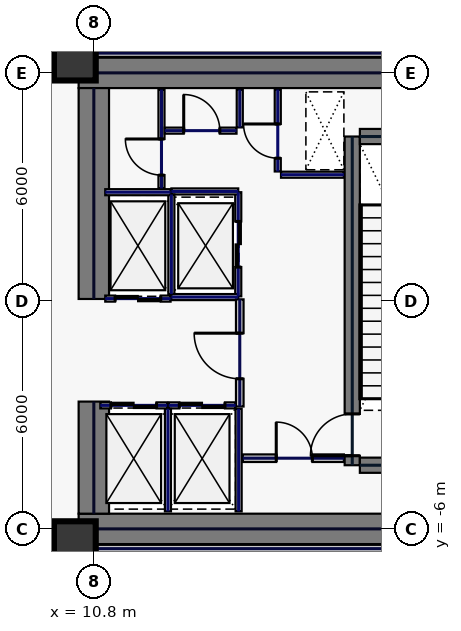
"""IFC4 building model, lengths in metres.
Left out: names, types, materials, properties, quantities, classifications, styles, units other than length and angle.
Written with IfcOpenShell. Run it as: python <this file> out.ifc"""

import sys

from ifc_helpers import new_model, si_unit, direction, frame, frame_2d, origin, origin_2d, place, context, subcontext, project, spatial, rectangle, extrude, element, fill, save


model = new_model("IFC4")
c1 = context("Model", 3, precision=1e-05, world=origin(), true_north=direction((0.0, 1.0)))
c2 = subcontext(c1, "Body", "Model", "MODEL_VIEW")
j1 = project(units=[si_unit("LENGTHUNIT", "METRE"), si_unit("PLANEANGLEUNIT", "RADIAN")], contexts=[c1])
p1 = place(None, origin())
s1 = spatial("IfcSite", under=j1, at=p1, CompositionType="ELEMENT")
p2 = place(p1, origin())
s2 = spatial("IfcBuilding", under=s1, at=p2, CompositionType="ELEMENT")
p3 = place(p2, frame((0.0, 0.0, -5.4)))
s3 = spatial("IfcBuildingStorey", under=s2, at=p3, CompositionType="ELEMENT", Elevation=-5.4)
for number, where, z_axis, x_axis in (
    (1, (10.4, 6.0, 0.0), (0.0, 0.0, 1.0), (1.0, 0.0, 0.0)),
    (2, (10.4, -6.0, 0.0), (0.0, 0.0, 1.0), (1.0, 0.0, 0.0)),
):
    element("IfcWall", number, at=place(p3, frame(where, z_axis=z_axis, x_axis=x_axis)), inside=s3, PredefinedType="SHEAR", context=c2, shape_type="SweptSolid", body=[
        extrude(rectangle(XDim=11.6, YDim=0.8, at=frame_2d((5.8, 0.0))), origin(), (0.0, 0.0, 1.0), 5.05),
    ])
p4 = place(p3, frame((10.8, -5.6, 0.0), z_axis=(0.0, 0.0, 1.0), x_axis=(0.0, 1.0, 0.0)))
e3 = element("IfcWall", 3, at=p4, inside=s3, PredefinedType="SHEAR", context=c2, shape_type="SweptSolid", body=[
    extrude(rectangle(XDim=2.95, YDim=0.8, at=frame_2d((1.475, 0.0))), origin(), (0.0, 0.0, 1.0), 5.05),
])
p5 = place(p3, frame((10.8, 0.05, 0.0), z_axis=(0.0, 0.0, 1.0), x_axis=(0.0, 1.0, 0.0)))
e4 = element("IfcWall", 4, at=p5, inside=s3, PredefinedType="SHEAR", context=c2, shape_type="SweptSolid", body=[
    extrude(rectangle(XDim=5.55, YDim=0.8, at=frame_2d((2.775, 0.0))), origin(), (0.0, 0.0, 1.0), 5.05),
])
p6 = place(p3, frame((17.6, -4.325, 0.0), z_axis=(0.0, 0.0, 1.0), x_axis=(0.0, 1.0, 0.0)))
e5 = element("IfcWall", 5, at=p6, inside=s3, PredefinedType="SHEAR", context=c2, shape_type="SweptSolid", body=[
    extrude(rectangle(XDim=8.65, YDim=0.4, at=frame_2d((4.325, 0.0))), origin(), (0.0, 0.0, 1.0), 5.05),
])
p7 = place(p6, frame((0.25, 0.0, 0.0)))
e6 = element("IfcOpeningElement", 6, at=p7, cuts=e5, PredefinedType="OPENING", context=c2, shape_type="SweptSolid", body=[
    extrude(rectangle(XDim=1.1, YDim=2.2, at=frame_2d((0.55, 1.1))), frame((0.0, 0.21, 0.0), z_axis=(0.0, -1.0, 0.0), x_axis=(1.0, 0.0, 0.0)), (0.0, 0.0, 1.0), 0.42),
])
for number, where, z_axis, x_axis in (
    (7, (17.8, -4.325, 0.0), (0.0, 0.0, 1.0), (1.0, 0.0, 0.0)),
    (8, (17.8, 4.325, 0.0), (0.0, 0.0, 1.0), (1.0, 0.0, 0.0)),
):
    element("IfcWall", number, at=place(p3, frame(where, z_axis=z_axis, x_axis=x_axis)), inside=s3, PredefinedType="SHEAR", context=c2, shape_type="SweptSolid", body=[
        extrude(rectangle(XDim=3.4, YDim=0.4, at=frame_2d((1.7, 0.0))), origin(), (0.0, 0.0, 1.0), 5.05),
    ])
for number, where, z_axis, x_axis in (
    (9, (10.3, -6.35, 0.0), (0.0, 0.0, 1.0), (1.0, 0.0, 0.0)),
    (10, (10.3, 6.35, 0.0), (0.0, 0.0, 1.0), (1.0, 0.0, 0.0)),
):
    element("IfcColumn", number, at=place(p3, frame(where, z_axis=z_axis, x_axis=x_axis)), inside=s3, PredefinedType="COLUMN", context=c2, shape_type="SweptSolid", body=[
        extrude(rectangle(XDim=1.1, YDim=1.1, at=origin_2d()), origin(), (0.0, 0.0, 1.0), 5.05),
    ])
p8 = place(p3, frame((14.6, 0.12, 0.0), z_axis=(0.0, 0.0, 1.0), x_axis=(0.0, 1.0, 0.0)))
e11 = element("IfcWall", 11, at=p8, inside=s3, PredefinedType="PARTITIONING", context=c2, shape_type="SweptSolid", body=[
    extrude(rectangle(XDim=2.74, YDim=0.16, at=frame_2d((1.37, 0.0))), origin(), (0.0, 0.0, 1.0), 5.05),
])
p9 = place(p8, frame((0.77, 0.0, 0.0)))
e12 = element("IfcOpeningElement", 12, at=p9, cuts=e11, PredefinedType="OPENING", context=c2, shape_type="SweptSolid", body=[
    extrude(rectangle(XDim=1.2, YDim=2.2, at=frame_2d((0.6, 1.1))), frame((0.0, 0.09, 0.0), z_axis=(0.0, -1.0, 0.0), x_axis=(1.0, 0.0, 0.0)), (0.0, 0.0, 1.0), 0.18),
])
for number, where, z_axis, x_axis in (
    (13, (12.84, 0.1, 0.0), (0.0, 0.0, 1.0), (1.0, 0.0, 0.0)),
    (14, (12.84, 2.88, 0.0), (0.0, 0.0, 1.0), (1.0, 0.0, 0.0)),
):
    element("IfcWall", number, at=place(p3, frame(where, z_axis=z_axis, x_axis=x_axis)), inside=s3, PredefinedType="PARTITIONING", context=c2, shape_type="SweptSolid", body=[
        extrude(rectangle(XDim=1.76, YDim=0.16, at=frame_2d((0.88, 0.0))), origin(), (0.0, 0.0, 1.0), 5.05),
    ])
p10 = place(p3, frame((12.84, 0.18, 0.0), z_axis=(0.0, 0.0, 1.0), x_axis=(0.0, 1.0, 0.0)))
e15 = element("IfcWall", 15, at=p10, inside=s3, PredefinedType="PARTITIONING", context=c2, shape_type="SweptSolid", body=[
    extrude(rectangle(XDim=2.62, YDim=0.16, at=frame_2d((1.31, 0.0))), origin(), (0.0, 0.0, 1.0), 5.05),
])
p11 = place(p3, frame((12.77, -2.75, 0.0), z_axis=(0.0, 0.0, 1.0), x_axis=(1.0, 0.0, 0.0)))
e16 = element("IfcWall", 16, at=p11, inside=s3, PredefinedType="PARTITIONING", context=c2, shape_type="SweptSolid", body=[
    extrude(rectangle(XDim=1.76, YDim=0.16, at=frame_2d((0.88, 0.0))), origin(), (0.0, 0.0, 1.0), 5.05),
])
p12 = place(p11, frame((0.28, 0.0, 0.0)))
e17 = element("IfcOpeningElement", 17, at=p12, cuts=e16, PredefinedType="OPENING", context=c2, shape_type="SweptSolid", body=[
    extrude(rectangle(XDim=1.2, YDim=2.2, at=frame_2d((0.6, 1.1))), frame((0.0, 0.09, 0.0), z_axis=(0.0, -1.0, 0.0), x_axis=(1.0, 0.0, 0.0)), (0.0, 0.0, 1.0), 0.18),
])
for number, where, z_axis, x_axis in (
    (18, (12.75, -5.54, 0.0), (0.0, 0.0, 1.0), (0.0, 1.0, 0.0)),
    (19, (14.61, -5.54, 0.0), (0.0, 0.0, 1.0), (0.0, 1.0, 0.0)),
):
    element("IfcWall", number, at=place(p3, frame(where, z_axis=z_axis, x_axis=x_axis)), inside=s3, PredefinedType="PARTITIONING", context=c2, shape_type="SweptSolid", body=[
        extrude(rectangle(XDim=2.7, YDim=0.16, at=frame_2d((1.35, 0.0))), origin(), (0.0, 0.0, 1.0), 5.05),
    ])
p13 = place(p3, frame((10.97, -2.75, 0.0), z_axis=(0.0, 0.0, 1.0), x_axis=(1.0, 0.0, 0.0)))
e20 = element("IfcWall", 20, at=p13, inside=s3, PredefinedType="PARTITIONING", context=c2, shape_type="SweptSolid", body=[
    extrude(rectangle(XDim=1.76, YDim=0.16, at=frame_2d((0.88, 0.0))), origin(), (0.0, 0.0, 1.0), 5.05),
])
p14 = place(p13, frame((0.28, 0.0, 0.0)))
e21 = element("IfcOpeningElement", 21, at=p14, cuts=e20, PredefinedType="OPENING", context=c2, shape_type="SweptSolid", body=[
    extrude(rectangle(XDim=1.2, YDim=2.2, at=frame_2d((0.6, 1.1))), frame((0.0, 0.09, 0.0), z_axis=(0.0, -1.0, 0.0), x_axis=(1.0, 0.0, 0.0)), (0.0, 0.0, 1.0), 0.18),
])
p15 = place(p3, frame((11.1, 0.06, 0.0), z_axis=(0.0, 0.0, 1.0), x_axis=(1.0, 0.0, 0.0)))
e22 = element("IfcWall", 22, at=p15, inside=s3, PredefinedType="PARTITIONING", context=c2, shape_type="SweptSolid", body=[
    extrude(rectangle(XDim=1.72, YDim=0.16, at=frame_2d((0.86, 0.0))), origin(), (0.0, 0.0, 1.0), 5.05),
])
p16 = place(p15, frame((0.26, 0.0, 0.0)))
e23 = element("IfcOpeningElement", 23, at=p16, cuts=e22, PredefinedType="OPENING", context=c2, shape_type="SweptSolid", body=[
    extrude(rectangle(XDim=1.2, YDim=2.2, at=frame_2d((0.6, 1.1))), frame((0.0, 0.09, 0.0), z_axis=(0.0, -1.0, 0.0), x_axis=(1.0, 0.0, 0.0)), (0.0, 0.0, 1.0), 0.18),
])
p17 = place(p3, frame((11.1, 2.86, 0.0), z_axis=(0.0, 0.0, 1.0), x_axis=(1.0, 0.0, 0.0)))
e24 = element("IfcWall", 24, at=p17, inside=s3, PredefinedType="PARTITIONING", context=c2, shape_type="SweptSolid", body=[
    extrude(rectangle(XDim=1.72, YDim=0.16, at=frame_2d((0.86, 0.0))), origin(), (0.0, 0.0, 1.0), 5.05),
])
p18 = place(p3, frame((15.64, 3.405, 0.0), z_axis=(0.0, 0.0, 1.0), x_axis=(0.0, 1.0, 0.0)))
e25 = element("IfcWall", 25, at=p18, inside=s3, PredefinedType="PARTITIONING", context=c2, shape_type="SweptSolid", body=[
    extrude(rectangle(XDim=2.155, YDim=0.16, at=frame_2d((1.078, 0.0))), origin(), (0.0, 0.0, 1.0), 5.05),
])
p19 = place(p18, frame((0.35, 0.0, 0.0)))
e26 = element("IfcOpeningElement", 26, at=p19, cuts=e25, PredefinedType="OPENING", context=c2, shape_type="SweptSolid", body=[
    extrude(rectangle(XDim=0.9, YDim=2.2, at=frame_2d((0.45, 1.1))), frame((0.0, 0.09, 0.0), z_axis=(0.0, -1.0, 0.0), x_axis=(1.0, 0.0, 0.0)), (0.0, 0.0, 1.0), 0.18),
])
p20 = place(p3, frame((15.725, 3.32, 0.0), z_axis=(0.0, 0.0, 1.0), x_axis=(1.0, 0.0, 0.0)))
e27 = element("IfcWall", 27, at=p20, inside=s3, PredefinedType="PARTITIONING", context=c2, shape_type="SweptSolid", body=[
    extrude(rectangle(XDim=1.655, YDim=0.16, at=frame_2d((0.827, 0.0))), origin(), (0.0, 0.0, 1.0), 5.05),
])
p21 = place(p3, frame((14.72, -4.14, 0.0), z_axis=(0.0, 0.0, 1.0), x_axis=(1.0, 0.0, 0.0)))
e28 = element("IfcWall", 28, at=p21, inside=s3, PredefinedType="SOLIDWALL", context=c2, shape_type="SweptSolid", body=[
    extrude(rectangle(XDim=2.66, YDim=0.2, at=frame_2d((1.33, 0.0))), origin(), (0.0, 0.0, 1.0), 5.05),
])
p22 = place(p21, frame((0.88, 0.0, 0.0)))
e29 = element("IfcOpeningElement", 29, at=p22, cuts=e28, PredefinedType="OPENING", context=c2, shape_type="SweptSolid", body=[
    extrude(rectangle(XDim=0.95, YDim=2.2, at=frame_2d((0.475, 1.1))), frame((0.0, 0.11, 0.0), z_axis=(0.0, -1.0, 0.0), x_axis=(1.0, 0.0, 0.0)), (0.0, 0.0, 1.0), 0.22),
])
p23 = place(p3, frame((12.58, 2.96, 0.0), z_axis=(0.0, 0.0, 1.0), x_axis=(0.0, 1.0, 0.0)))
e30 = element("IfcWall", 30, at=p23, inside=s3, PredefinedType="PARTITIONING", context=c2, shape_type="SweptSolid", body=[
    extrude(rectangle(XDim=2.6, YDim=0.16, at=frame_2d((1.3, 0.0))), origin(), (0.0, 0.0, 1.0), 5.05),
])
p24 = place(p23, frame((0.35, 0.0, 0.0)))
e31 = element("IfcOpeningElement", 31, at=p24, cuts=e30, PredefinedType="OPENING", context=c2, shape_type="SweptSolid", body=[
    extrude(rectangle(XDim=0.95, YDim=2.2, at=frame_2d((0.475, 1.1))), frame((0.0, 0.09, 0.0), z_axis=(0.0, -1.0, 0.0), x_axis=(1.0, 0.0, 0.0)), (0.0, 0.0, 1.0), 0.18),
])
p25 = place(p3, frame((12.665, 4.48, 0.0), z_axis=(0.0, 0.0, 1.0), x_axis=(1.0, 0.0, 0.0)))
e32 = element("IfcWall", 32, at=p25, inside=s3, PredefinedType="PARTITIONING", context=c2, shape_type="SweptSolid", body=[
    extrude(rectangle(XDim=1.89, YDim=0.16, at=frame_2d((0.945, 0.0))), origin(), (0.0, 0.0, 1.0), 5.05),
])
p26 = place(p25, frame((0.5, 0.0, 0.0)))
e33 = element("IfcOpeningElement", 33, at=p26, cuts=e32, PredefinedType="OPENING", context=c2, shape_type="SweptSolid", body=[
    extrude(rectangle(XDim=0.95, YDim=2.2, at=frame_2d((0.475, 1.1))), frame((0.0, 0.09, 0.0), z_axis=(0.0, -1.0, 0.0), x_axis=(1.0, 0.0, 0.0)), (0.0, 0.0, 1.0), 0.18),
])
p27 = place(p3, frame((14.64, 4.565, 0.0), z_axis=(0.0, 0.0, 1.0), x_axis=(0.0, 1.0, 0.0)))
e34 = element("IfcWall", 34, at=p27, inside=s3, PredefinedType="PARTITIONING", context=c2, shape_type="SweptSolid", body=[
    extrude(rectangle(XDim=0.995, YDim=0.16, at=frame_2d((0.498, 0.0))), origin(), (0.0, 0.0, 1.0), 5.05),
])
p28 = place(p3, frame((14.64, -2.78, 0.0), z_axis=(0.0, 0.0, 1.0), x_axis=(0.0, 1.0, 0.0)))
e35 = element("IfcWall", 35, at=p28, inside=s3, PredefinedType="SOLIDWALL", context=c2, shape_type="SweptSolid", body=[
    extrude(rectangle(XDim=2.82, YDim=0.2, at=frame_2d((1.41, 0.0))), origin(), (0.0, 0.0, 1.0), 5.05),
])
p29 = place(p28, frame((0.73, 0.0, 0.0)))
e36 = element("IfcOpeningElement", 36, at=p29, cuts=e35, PredefinedType="OPENING", context=c2, shape_type="SweptSolid", body=[
    extrude(rectangle(XDim=1.2, YDim=2.2, at=frame_2d((0.6, 1.1))), frame((0.0, 0.11, 0.0), z_axis=(0.0, -1.0, 0.0), x_axis=(1.0, 0.0, 0.0)), (0.0, 0.0, 1.0), 0.22),
])
for number, where, z_axis, x_axis in (
    (37, (25.615, 6.52, 0.0), (0.0, 0.0, 1.0), (-1.0, 0.0, 0.0)),
    (38, (10.38, -6.52, 0.0), (0.0, 0.0, 1.0), (1.0, 0.0, 0.0)),
):
    element("IfcWall", number, at=place(p3, frame(where, z_axis=z_axis, x_axis=x_axis)), inside=s3, PredefinedType="SOLIDWALL", context=c2, shape_type="SweptSolid", body=[
        extrude(rectangle(XDim=15.235, YDim=0.2, at=frame_2d((7.618, 0.0))), origin(), (0.0, 0.0, 1.0), 5.05),
    ])
p30 = place(p7, origin())
e39 = element("IfcDoor", 39, at=p30, inside=s3, OperationType="SINGLE_SWING_LEFT", PredefinedType="DOOR", context=c2, shape_type="SweptSolid", body=[
    extrude(rectangle(XDim=1.1, YDim=2.2, at=frame_2d((0.55, 1.1))), frame((0.0, 0.025, 0.0), z_axis=(0.0, -1.0, 0.0), x_axis=(1.0, 0.0, 0.0)), (0.0, 0.0, 1.0), 0.05),
])
fill(e6, e39)
p31 = place(p9, origin())
e40 = element("IfcDoor", 40, at=p31, inside=s3, OperationType="SLIDING_TO_LEFT", PredefinedType="DOOR", context=c2, shape_type="SweptSolid", body=[
    extrude(rectangle(XDim=1.2, YDim=2.2, at=frame_2d((0.6, 1.1))), frame((0.0, 0.025, 0.0), z_axis=(0.0, -1.0, 0.0), x_axis=(1.0, 0.0, 0.0)), (0.0, 0.0, 1.0), 0.05),
])
fill(e12, e40)
p32 = place(p12, origin())
e41 = element("IfcDoor", 41, at=p32, inside=s3, OperationType="SLIDING_TO_LEFT", PredefinedType="DOOR", context=c2, shape_type="SweptSolid", body=[
    extrude(rectangle(XDim=1.2, YDim=2.2, at=frame_2d((0.6, 1.1))), frame((0.0, 0.025, 0.0), z_axis=(0.0, -1.0, 0.0), x_axis=(1.0, 0.0, 0.0)), (0.0, 0.0, 1.0), 0.05),
])
fill(e17, e41)
p33 = place(p14, origin())
e42 = element("IfcDoor", 42, at=p33, inside=s3, OperationType="SLIDING_TO_LEFT", PredefinedType="DOOR", context=c2, shape_type="SweptSolid", body=[
    extrude(rectangle(XDim=1.2, YDim=2.2, at=frame_2d((0.6, 1.1))), frame((0.0, 0.025, 0.0), z_axis=(0.0, -1.0, 0.0), x_axis=(1.0, 0.0, 0.0)), (0.0, 0.0, 1.0), 0.05),
])
fill(e21, e42)
p34 = place(p16, origin())
e43 = element("IfcDoor", 43, at=p34, inside=s3, OperationType="SLIDING_TO_LEFT", PredefinedType="DOOR", context=c2, shape_type="SweptSolid", body=[
    extrude(rectangle(XDim=1.2, YDim=2.2, at=frame_2d((0.6, 1.1))), frame((0.0, 0.025, 0.0), z_axis=(0.0, -1.0, 0.0), x_axis=(1.0, 0.0, 0.0)), (0.0, 0.0, 1.0), 0.05),
])
fill(e23, e43)
p35 = place(p19, origin())
e44 = element("IfcDoor", 44, at=p35, inside=s3, OperationType="SINGLE_SWING_RIGHT", PredefinedType="DOOR", context=c2, shape_type="SweptSolid", body=[
    extrude(rectangle(XDim=0.9, YDim=2.2, at=frame_2d((0.45, 1.1))), frame((0.0, 0.025, 0.0), z_axis=(0.0, -1.0, 0.0), x_axis=(1.0, 0.0, 0.0)), (0.0, 0.0, 1.0), 0.05),
])
fill(e26, e44)
p36 = place(p22, origin())
e45 = element("IfcDoor", 45, at=p36, inside=s3, OperationType="SINGLE_SWING_LEFT", PredefinedType="DOOR", context=c2, shape_type="SweptSolid", body=[
    extrude(rectangle(XDim=0.95, YDim=2.2, at=frame_2d((0.475, 1.1))), frame((0.0, 0.025, 0.0), z_axis=(0.0, -1.0, 0.0), x_axis=(1.0, 0.0, 0.0)), (0.0, 0.0, 1.0), 0.05),
])
fill(e29, e45)
p37 = place(p24, origin())
e46 = element("IfcDoor", 46, at=p37, inside=s3, OperationType="SINGLE_SWING_RIGHT", PredefinedType="DOOR", context=c2, shape_type="SweptSolid", body=[
    extrude(rectangle(XDim=0.95, YDim=2.2, at=frame_2d((0.475, 1.1))), frame((0.0, 0.025, 0.0), z_axis=(0.0, -1.0, 0.0), x_axis=(1.0, 0.0, 0.0)), (0.0, 0.0, 1.0), 0.05),
])
fill(e31, e46)
p38 = place(p26, origin())
e47 = element("IfcDoor", 47, at=p38, inside=s3, OperationType="SINGLE_SWING_LEFT", PredefinedType="DOOR", context=c2, shape_type="SweptSolid", body=[
    extrude(rectangle(XDim=0.95, YDim=2.2, at=frame_2d((0.475, 1.1))), frame((0.0, 0.025, 0.0), z_axis=(0.0, -1.0, 0.0), x_axis=(1.0, 0.0, 0.0)), (0.0, 0.0, 1.0), 0.05),
])
fill(e33, e47)
p39 = place(p29, origin())
e48 = element("IfcDoor", 48, at=p39, inside=s3, OperationType="SINGLE_SWING_RIGHT", PredefinedType="DOOR", context=c2, shape_type="SweptSolid", body=[
    extrude(rectangle(XDim=1.2, YDim=2.2, at=frame_2d((0.6, 1.1))), frame((0.0, 0.025, 0.0), z_axis=(0.0, -1.0, 0.0), x_axis=(1.0, 0.0, 0.0)), (0.0, 0.0, 1.0), 0.05),
])
fill(e36, e48)
save(model, sys.argv[1])
